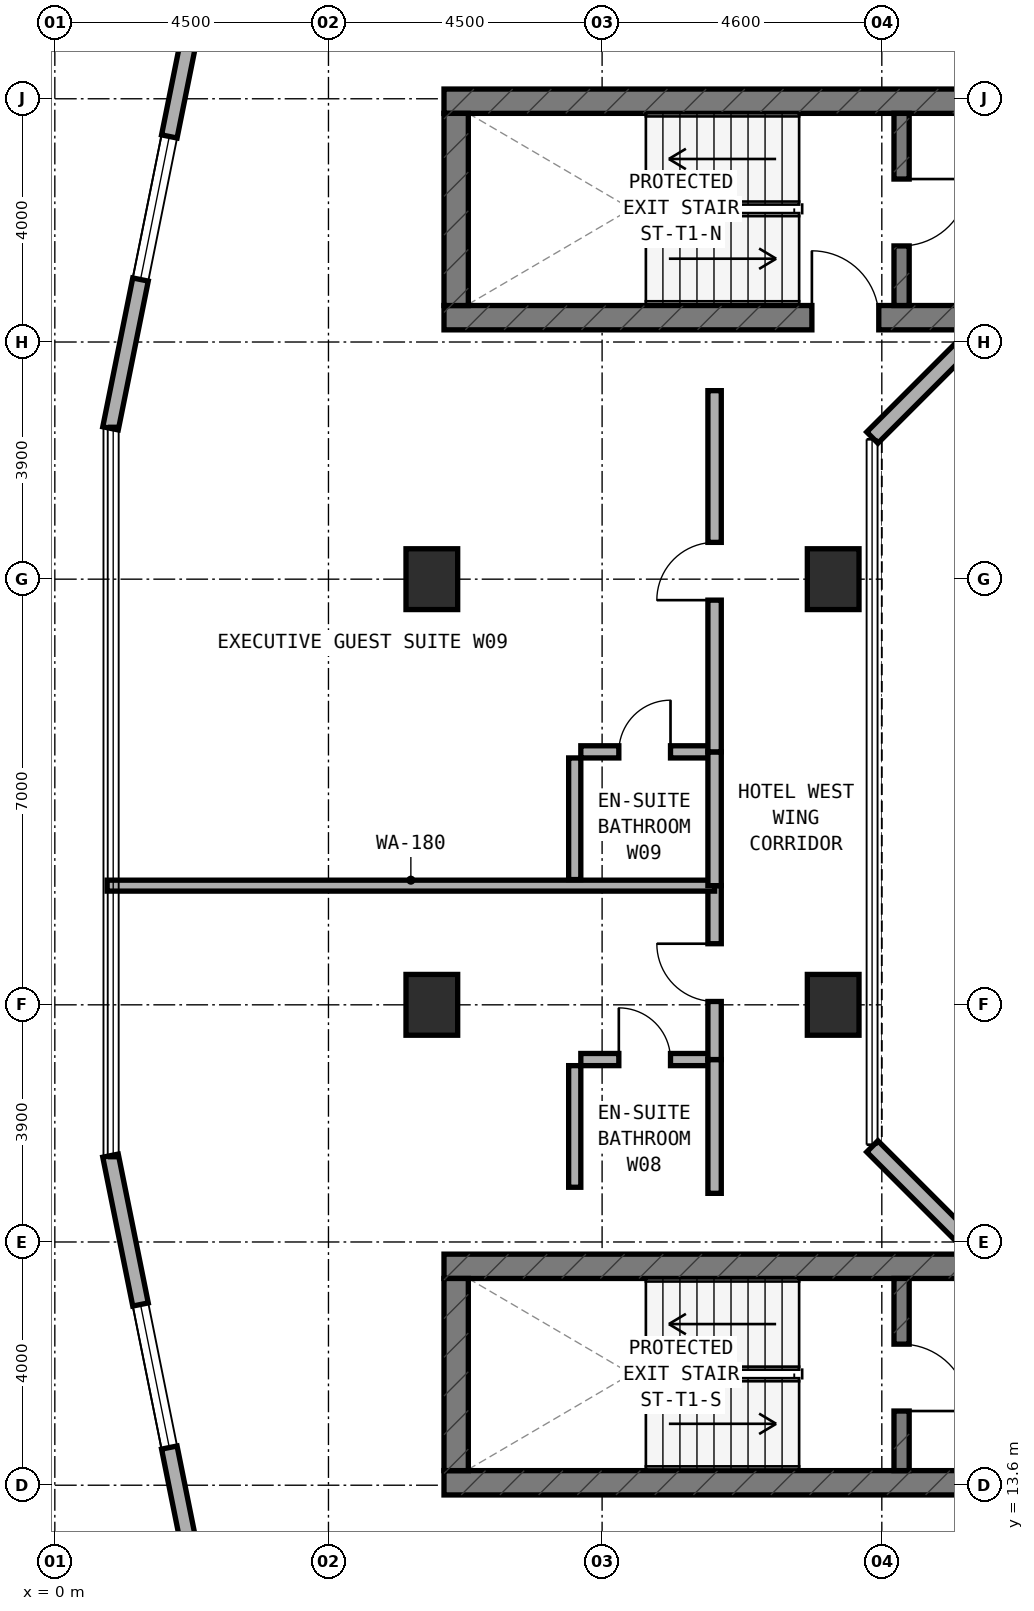
"""IFC4 building model, lengths in metres.
Left out: names, types, materials, properties, quantities, classifications, styles, units other than length and angle.
Written with IfcOpenShell. Run it as: python <this file> out.ifc"""

import sys

from ifc_helpers import new_model, si_unit, direction, frame, frame_2d, origin, origin_2d, place, context, subcontext, project, spatial, rectangle, extrude, element, fill, save


model = new_model("IFC4")
c1 = context("Model", 3, precision=1e-05, world=origin(), true_north=direction((0.0, 1.0)))
c2 = subcontext(c1, "Body", "Model", "MODEL_VIEW")
j1 = project(units=[si_unit("LENGTHUNIT", "METRE"), si_unit("PLANEANGLEUNIT", "RADIAN")], contexts=[c1])
p1 = place(None, origin())
s1 = spatial("IfcSite", under=j1, at=p1, CompositionType="ELEMENT")
p2 = place(p1, origin())
s2 = spatial("IfcBuilding", under=s1, at=p2, CompositionType="ELEMENT")
p3 = place(p2, frame((0.0, 0.0, 127.5)))
s3 = spatial("IfcBuildingStorey", under=s2, at=p3, CompositionType="ELEMENT", Elevation=127.5)
p4 = place(p3, frame((6.4, 32.8, 0.0), z_axis=(0.0, 0.0, 1.0), x_axis=(1.0, 0.0, 0.0)))
e1 = element("IfcWall", 1, at=p4, inside=s3, PredefinedType="SHEAR", context=c2, shape_type="SweptSolid", body=[
    extrude(rectangle(XDim=24.4, YDim=0.4, at=frame_2d((12.2, 0.0))), origin(), (0.0, 0.0, 1.0), 3.5),
])
p5 = place(p4, frame((6.05, 0.0, 0.0)))
e2 = element("IfcOpeningElement", 2, at=p5, cuts=e1, PredefinedType="OPENING", context=c2, shape_type="SweptSolid", body=[
    extrude(rectangle(XDim=1.1, YDim=2.15, at=frame_2d((0.55, 1.075))), frame((0.0, 0.21, 0.0), z_axis=(0.0, -1.0, 0.0), x_axis=(1.0, 0.0, 0.0)), (0.0, 0.0, 1.0), 0.42),
])
p6 = place(p3, frame((6.4, 36.36, 0.0), z_axis=(0.0, 0.0, 1.0), x_axis=(1.0, 0.0, 0.0)))
e3 = element("IfcWall", 3, at=p6, inside=s3, PredefinedType="SHEAR", context=c2, shape_type="SweptSolid", body=[
    extrude(rectangle(XDim=24.4, YDim=0.4, at=frame_2d((12.2, 0.0))), origin(), (0.0, 0.0, 1.0), 3.5),
])
p7 = place(p6, frame((9.15, 0.0, 0.0)))
e4 = element("IfcOpeningElement", 4, at=p7, cuts=e3, PredefinedType="OPENING", context=c2, shape_type="SweptSolid", body=[
    extrude(rectangle(XDim=1.2, YDim=2.15, at=frame_2d((0.6, 1.075))), frame((0.0, 0.21, 0.0), z_axis=(0.0, -1.0, 0.0), x_axis=(1.0, 0.0, 0.0)), (0.0, 0.0, 1.0), 0.42),
])
p8 = place(p6, frame((17.22, 0.0, 0.0)))
e5 = element("IfcOpeningElement", 5, at=p8, cuts=e3, PredefinedType="OPENING", context=c2, shape_type="SweptSolid", body=[
    extrude(rectangle(XDim=0.85, YDim=2.1, at=frame_2d((0.425, 1.05))), frame((0.0, 0.21, 0.0), z_axis=(0.0, -1.0, 0.0), x_axis=(1.0, 0.0, 0.0)), (0.0, 0.0, 1.0), 0.42),
])
p9 = place(p6, frame((18.783, 0.0, 0.0)))
e6 = element("IfcOpeningElement", 6, at=p9, cuts=e3, PredefinedType="OPENING", context=c2, shape_type="SweptSolid", body=[
    extrude(rectangle(XDim=1.1, YDim=2.15, at=frame_2d((0.55, 1.075))), frame((0.0, 0.21, 0.0), z_axis=(0.0, -1.0, 0.0), x_axis=(1.0, 0.0, 0.0)), (0.0, 0.0, 1.0), 0.42),
])
p10 = place(p6, frame((20.65, 0.0, 0.0)))
e7 = element("IfcOpeningElement", 7, at=p10, cuts=e3, PredefinedType="OPENING", context=c2, shape_type="SweptSolid", body=[
    extrude(rectangle(XDim=1.1, YDim=2.15, at=frame_2d((0.55, 1.075))), frame((0.0, 0.21, 0.0), z_axis=(0.0, -1.0, 0.0), x_axis=(1.0, 0.0, 0.0)), (0.0, 0.0, 1.0), 0.42),
])
p11 = place(p6, frame((22.517, 0.0, 0.0)))
e8 = element("IfcOpeningElement", 8, at=p11, cuts=e3, PredefinedType="OPENING", context=c2, shape_type="SweptSolid", body=[
    extrude(rectangle(XDim=1.1, YDim=2.15, at=frame_2d((0.55, 1.075))), frame((0.0, 0.21, 0.0), z_axis=(0.0, -1.0, 0.0), x_axis=(1.0, 0.0, 0.0)), (0.0, 0.0, 1.0), 0.42),
])
p12 = place(p3, frame((6.6, 33.0, 0.0), z_axis=(0.0, 0.0, 1.0), x_axis=(0.0, 1.0, 0.0)))
e9 = element("IfcWall", 9, at=p12, inside=s3, PredefinedType="SHEAR", context=c2, shape_type="SweptSolid", body=[
    extrude(rectangle(XDim=3.16, YDim=0.4, at=frame_2d((1.58, 0.0))), origin(), (0.0, 0.0, 1.0), 3.5),
])
p13 = place(p3, frame((13.925, 33.0, 0.0), z_axis=(0.0, 0.0, 1.0), x_axis=(0.0, 1.0, 0.0)))
e10 = element("IfcWall", 10, at=p13, inside=s3, PredefinedType="STANDARD", context=c2, shape_type="SweptSolid", body=[
    extrude(rectangle(XDim=3.16, YDim=0.25, at=frame_2d((1.58, 0.0))), origin(), (0.0, 0.0, 1.0), 3.22),
])
p14 = place(p13, frame((0.98, 0.0, 0.0)))
e11 = element("IfcOpeningElement", 11, at=p14, cuts=e10, PredefinedType="OPENING", context=c2, shape_type="SweptSolid", body=[
    extrude(rectangle(XDim=1.1, YDim=2.15, at=frame_2d((0.55, 1.075))), frame((0.0, 0.135, 0.0), z_axis=(0.0, -1.0, 0.0), x_axis=(1.0, 0.0, 0.0)), (0.0, 0.0, 1.0), 0.27),
])
p15 = place(p3, frame((6.4, 13.64, 0.0), z_axis=(0.0, 0.0, 1.0), x_axis=(1.0, 0.0, 0.0)))
e12 = element("IfcWall", 12, at=p15, inside=s3, PredefinedType="SHEAR", context=c2, shape_type="SweptSolid", body=[
    extrude(rectangle(XDim=24.4, YDim=0.4, at=frame_2d((12.2, 0.0))), origin(), (0.0, 0.0, 1.0), 3.5),
])
p16 = place(p15, frame((9.15, 0.0, 0.0)))
e13 = element("IfcOpeningElement", 13, at=p16, cuts=e12, PredefinedType="OPENING", context=c2, shape_type="SweptSolid", body=[
    extrude(rectangle(XDim=1.2, YDim=2.15, at=frame_2d((0.6, 1.075))), frame((0.0, 0.21, 0.0), z_axis=(0.0, -1.0, 0.0), x_axis=(1.0, 0.0, 0.0)), (0.0, 0.0, 1.0), 0.42),
])
p17 = place(p15, frame((17.22, 0.0, 0.0)))
e14 = element("IfcOpeningElement", 14, at=p17, cuts=e12, PredefinedType="OPENING", context=c2, shape_type="SweptSolid", body=[
    extrude(rectangle(XDim=0.85, YDim=2.1, at=frame_2d((0.425, 1.05))), frame((0.0, 0.21, 0.0), z_axis=(0.0, -1.0, 0.0), x_axis=(1.0, 0.0, 0.0)), (0.0, 0.0, 1.0), 0.42),
])
p18 = place(p15, frame((18.783, 0.0, 0.0)))
e15 = element("IfcOpeningElement", 15, at=p18, cuts=e12, PredefinedType="OPENING", context=c2, shape_type="SweptSolid", body=[
    extrude(rectangle(XDim=1.1, YDim=2.15, at=frame_2d((0.55, 1.075))), frame((0.0, 0.21, 0.0), z_axis=(0.0, -1.0, 0.0), x_axis=(1.0, 0.0, 0.0)), (0.0, 0.0, 1.0), 0.42),
])
p19 = place(p15, frame((20.65, 0.0, 0.0)))
e16 = element("IfcOpeningElement", 16, at=p19, cuts=e12, PredefinedType="OPENING", context=c2, shape_type="SweptSolid", body=[
    extrude(rectangle(XDim=1.1, YDim=2.15, at=frame_2d((0.55, 1.075))), frame((0.0, 0.21, 0.0), z_axis=(0.0, -1.0, 0.0), x_axis=(1.0, 0.0, 0.0)), (0.0, 0.0, 1.0), 0.42),
])
p20 = place(p15, frame((22.517, 0.0, 0.0)))
e17 = element("IfcOpeningElement", 17, at=p20, cuts=e12, PredefinedType="OPENING", context=c2, shape_type="SweptSolid", body=[
    extrude(rectangle(XDim=1.1, YDim=2.15, at=frame_2d((0.55, 1.075))), frame((0.0, 0.21, 0.0), z_axis=(0.0, -1.0, 0.0), x_axis=(1.0, 0.0, 0.0)), (0.0, 0.0, 1.0), 0.42),
])
p21 = place(p3, frame((6.4, 17.2, 0.0), z_axis=(0.0, 0.0, 1.0), x_axis=(1.0, 0.0, 0.0)))
e18 = element("IfcWall", 18, at=p21, inside=s3, PredefinedType="SHEAR", context=c2, shape_type="SweptSolid", body=[
    extrude(rectangle(XDim=24.4, YDim=0.4, at=frame_2d((12.2, 0.0))), origin(), (0.0, 0.0, 1.0), 3.5),
])
p22 = place(p3, frame((6.6, 13.84, 0.0), z_axis=(0.0, 0.0, 1.0), x_axis=(0.0, 1.0, 0.0)))
e19 = element("IfcWall", 19, at=p22, inside=s3, PredefinedType="SHEAR", context=c2, shape_type="SweptSolid", body=[
    extrude(rectangle(XDim=3.16, YDim=0.4, at=frame_2d((1.58, 0.0))), origin(), (0.0, 0.0, 1.0), 3.5),
])
p23 = place(p3, frame((13.925, 13.84, 0.0), z_axis=(0.0, 0.0, 1.0), x_axis=(0.0, 1.0, 0.0)))
e20 = element("IfcWall", 20, at=p23, inside=s3, PredefinedType="STANDARD", context=c2, shape_type="SweptSolid", body=[
    extrude(rectangle(XDim=3.16, YDim=0.25, at=frame_2d((1.58, 0.0))), origin(), (0.0, 0.0, 1.0), 3.22),
])
p24 = place(p23, frame((0.98, 0.0, 0.0)))
e21 = element("IfcOpeningElement", 21, at=p24, cuts=e20, PredefinedType="OPENING", context=c2, shape_type="SweptSolid", body=[
    extrude(rectangle(XDim=1.1, YDim=2.15, at=frame_2d((0.55, 1.075))), frame((0.0, 0.135, 0.0), z_axis=(0.0, -1.0, 0.0), x_axis=(1.0, 0.0, 0.0)), (0.0, 0.0, 1.0), 0.27),
])
for number, where, z_axis, x_axis in (
    (22, (6.2, 21.5, 0.0), (0.0, 0.0, 1.0), (1.0, 0.0, 0.0)),
    (23, (6.2, 28.5, 0.0), (0.0, 0.0, 1.0), (1.0, 0.0, 0.0)),
    (24, (12.8, 21.5, 0.0), (0.0, 0.0, 1.0), (1.0, 0.0, 0.0)),
    (25, (12.8, 28.5, 0.0), (0.0, 0.0, 1.0), (1.0, 0.0, 0.0)),
):
    element("IfcColumn", number, at=place(p3, frame(where, z_axis=z_axis, x_axis=x_axis)), inside=s3, PredefinedType="COLUMN", context=c2, shape_type="SweptSolid", body=[
        extrude(rectangle(XDim=0.85, YDim=1.0, at=origin_2d()), origin(), (0.0, 0.0, 1.0), 3.5),
    ])
p25 = place(p3, frame((2.729, 39.982, 0.0), z_axis=(0.0, 0.0, 1.0), x_axis=(-0.197435082048, -0.980315963543, 0.0)))
e26 = element("IfcWall", 26, at=p25, inside=s3, PredefinedType="STANDARD", context=c2, shape_type="SweptSolid", body=[
    extrude(rectangle(XDim=9.183, YDim=0.26, at=frame_2d((4.591, 0.0))), origin(), (0.0, 0.0, 1.0), 3.22),
])
p26 = place(p25, frame((4.286, 0.0, 0.8)))
e27 = element("IfcOpeningElement", 27, at=p26, cuts=e26, PredefinedType="OPENING", context=c2, shape_type="SweptSolid", body=[
    extrude(rectangle(XDim=2.4, YDim=1.6, at=frame_2d((1.2, 0.8))), frame((0.0, 0.14, 0.0), z_axis=(0.0, -1.0, 0.0), x_axis=(1.0, 0.0, 0.0)), (0.0, 0.0, 1.0), 0.28),
])
p27 = place(p3, frame((0.916, 19.02, 0.0), z_axis=(0.0, 0.0, 1.0), x_axis=(0.197435082048, -0.980315963543, 0.0)))
e28 = element("IfcWall", 28, at=p27, inside=s3, PredefinedType="STANDARD", context=c2, shape_type="SweptSolid", body=[
    extrude(rectangle(XDim=9.183, YDim=0.26, at=frame_2d((4.591, 0.0))), origin(), (0.0, 0.0, 1.0), 3.22),
])
p28 = place(p27, frame((2.497, 0.0, 0.8)))
e29 = element("IfcOpeningElement", 29, at=p28, cuts=e28, PredefinedType="OPENING", context=c2, shape_type="SweptSolid", body=[
    extrude(rectangle(XDim=2.4, YDim=1.6, at=frame_2d((1.2, 0.8))), frame((0.0, 0.14, 0.0), z_axis=(0.0, -1.0, 0.0), x_axis=(1.0, 0.0, 0.0)), (0.0, 0.0, 1.0), 0.28),
])
for number, where, z_axis, x_axis in (
    (30, (15.278, 32.662, 0.0), (0.0, 0.0, 1.0), (-0.707, -0.707, 0.0)),
    (31, (13.444, 19.172, 0.0), (0.0, 0.0, 1.0), (0.707, -0.707, 0.0)),
):
    element("IfcWall", number, at=place(p3, frame(where, z_axis=z_axis, x_axis=x_axis)), inside=s3, PredefinedType="STANDARD", context=c2, shape_type="SweptSolid", body=[
        extrude(rectangle(XDim=2.594, YDim=0.26, at=frame_2d((1.297, 0.0))), origin(), (0.0, 0.0, 1.0), 3.22),
    ])
p29 = place(p3, frame((8.65, 20.6, 0.0), z_axis=(0.0, 0.0, 1.0), x_axis=(1.0, 0.0, 0.0)))
e32 = element("IfcWall", 32, at=p29, inside=s3, PredefinedType="PLUMBINGWALL", context=c2, shape_type="SweptSolid", body=[
    extrude(rectangle(XDim=2.1, YDim=0.2, at=frame_2d((1.05, 0.0))), origin(), (0.0, 0.0, 1.0), 3.22),
])
p30 = place(p29, frame((0.625, 0.0, 0.0)))
e33 = element("IfcOpeningElement", 33, at=p30, cuts=e32, PredefinedType="OPENING", context=c2, shape_type="SweptSolid", body=[
    extrude(rectangle(XDim=0.85, YDim=2.1, at=frame_2d((0.425, 1.05))), frame((0.0, 0.11, 0.0), z_axis=(0.0, -1.0, 0.0), x_axis=(1.0, 0.0, 0.0)), (0.0, 0.0, 1.0), 0.22),
])
p31 = place(p3, frame((8.55, 18.5, 0.0), z_axis=(0.0, 0.0, 1.0), x_axis=(0.0, 1.0, 0.0)))
e34 = element("IfcWall", 34, at=p31, inside=s3, PredefinedType="PLUMBINGWALL", context=c2, shape_type="SweptSolid", body=[
    extrude(rectangle(XDim=2.0, YDim=0.2, at=frame_2d((1.0, 0.0))), origin(), (0.0, 0.0, 1.0), 3.22),
])
p32 = place(p3, frame((10.85, 18.4, 0.0), z_axis=(0.0, 0.0, 1.0), x_axis=(0.0, 1.0, 0.0)))
e35 = element("IfcWall", 35, at=p32, inside=s3, PredefinedType="SOLIDWALL", context=c2, shape_type="SweptSolid", body=[
    extrude(rectangle(XDim=2.2, YDim=0.22, at=frame_2d((1.1, 0.0))), origin(), (0.0, 0.0, 1.0), 3.22),
])
p33 = place(p3, frame((10.85, 20.6, 0.0), z_axis=(0.0, 0.0, 1.0), x_axis=(0.0, 1.0, 0.0)))
e36 = element("IfcWall", 36, at=p33, inside=s3, PredefinedType="SOLIDWALL", context=c2, shape_type="SweptSolid", body=[
    extrude(rectangle(XDim=2.86, YDim=0.22, at=frame_2d((1.43, 0.0))), origin(), (0.0, 0.0, 1.0), 2.695),
])
p34 = place(p33, frame((0.955, 0.0, 0.0)))
e37 = element("IfcOpeningElement", 37, at=p34, cuts=e36, PredefinedType="OPENING", context=c2, shape_type="SweptSolid", body=[
    extrude(rectangle(XDim=0.95, YDim=2.1, at=frame_2d((0.475, 1.05))), frame((0.0, 0.12, 0.0), z_axis=(0.0, -1.0, 0.0), x_axis=(1.0, 0.0, 0.0)), (0.0, 0.0, 1.0), 0.24),
])
p35 = place(p3, frame((0.86, 23.46, 0.0), z_axis=(0.0, 0.0, 1.0), x_axis=(1.0, 0.0, 0.0)))
e38 = element("IfcWall", 38, at=p35, inside=s3, PredefinedType="SOLIDWALL", context=c2, shape_type="SweptSolid", body=[
    extrude(rectangle(XDim=9.99, YDim=0.18, at=frame_2d((4.995, 0.0))), origin(), (0.0, 0.0, 1.0), 2.835),
])
p36 = place(p3, frame((8.65, 25.66, 0.0), z_axis=(0.0, 0.0, 1.0), x_axis=(1.0, 0.0, 0.0)))
e39 = element("IfcWall", 39, at=p36, inside=s3, PredefinedType="PLUMBINGWALL", context=c2, shape_type="SweptSolid", body=[
    extrude(rectangle(XDim=2.1, YDim=0.2, at=frame_2d((1.05, 0.0))), origin(), (0.0, 0.0, 1.0), 3.22),
])
p37 = place(p36, frame((0.625, 0.0, 0.0)))
e40 = element("IfcOpeningElement", 40, at=p37, cuts=e39, PredefinedType="OPENING", context=c2, shape_type="SweptSolid", body=[
    extrude(rectangle(XDim=0.85, YDim=2.1, at=frame_2d((0.425, 1.05))), frame((0.0, 0.11, 0.0), z_axis=(0.0, -1.0, 0.0), x_axis=(1.0, 0.0, 0.0)), (0.0, 0.0, 1.0), 0.22),
])
p38 = place(p3, frame((8.55, 23.56, 0.0), z_axis=(0.0, 0.0, 1.0), x_axis=(0.0, 1.0, 0.0)))
e41 = element("IfcWall", 41, at=p38, inside=s3, PredefinedType="PLUMBINGWALL", context=c2, shape_type="SweptSolid", body=[
    extrude(rectangle(XDim=2.0, YDim=0.2, at=frame_2d((1.0, 0.0))), origin(), (0.0, 0.0, 1.0), 3.22),
])
p39 = place(p3, frame((10.85, 23.46, 0.0), z_axis=(0.0, 0.0, 1.0), x_axis=(0.0, 1.0, 0.0)))
e42 = element("IfcWall", 42, at=p39, inside=s3, PredefinedType="SOLIDWALL", context=c2, shape_type="SweptSolid", body=[
    extrude(rectangle(XDim=2.2, YDim=0.22, at=frame_2d((1.1, 0.0))), origin(), (0.0, 0.0, 1.0), 3.22),
])
p40 = place(p3, frame((10.85, 25.66, 0.0), z_axis=(0.0, 0.0, 1.0), x_axis=(0.0, 1.0, 0.0)))
e43 = element("IfcWall", 43, at=p40, inside=s3, PredefinedType="SOLIDWALL", context=c2, shape_type="SweptSolid", body=[
    extrude(rectangle(XDim=5.94, YDim=0.22, at=frame_2d((2.97, 0.0))), origin(), (0.0, 0.0, 1.0), 2.695),
])
p41 = place(p40, frame((2.495, 0.0, 0.0)))
e44 = element("IfcOpeningElement", 44, at=p41, cuts=e43, PredefinedType="OPENING", context=c2, shape_type="SweptSolid", body=[
    extrude(rectangle(XDim=0.95, YDim=2.1, at=frame_2d((0.475, 1.05))), frame((0.0, 0.12, 0.0), z_axis=(0.0, -1.0, 0.0), x_axis=(1.0, 0.0, 0.0)), (0.0, 0.0, 1.0), 0.24),
])
p42 = place(p26, origin())
e45 = element("IfcWindow", 45, at=p42, inside=s3, PartitioningType="SINGLE_PANEL", PredefinedType="WINDOW", context=c2, shape_type="SweptSolid", body=[
    extrude(rectangle(XDim=2.4, YDim=1.6, at=frame_2d((1.2, 0.8))), frame((0.0, 0.03, 0.0), z_axis=(0.0, -1.0, 0.0), x_axis=(1.0, 0.0, 0.0)), (0.0, 0.0, 1.0), 0.06),
])
fill(e27, e45)
p43 = place(p28, origin())
e46 = element("IfcWindow", 46, at=p43, inside=s3, PartitioningType="SINGLE_PANEL", PredefinedType="WINDOW", context=c2, shape_type="SweptSolid", body=[
    extrude(rectangle(XDim=2.4, YDim=1.6, at=frame_2d((1.2, 0.8))), frame((0.0, 0.03, 0.0), z_axis=(0.0, -1.0, 0.0), x_axis=(1.0, 0.0, 0.0)), (0.0, 0.0, 1.0), 0.06),
])
fill(e29, e46)
p44 = place(p14, frame((1.1, 0.0, 0.0), z_axis=(0.0, 0.0, 1.0), x_axis=(-1.0, 0.0, 0.0)))
e47 = element("IfcDoor", 47, at=p44, inside=s3, OperationType="SINGLE_SWING_LEFT", PredefinedType="DOOR", context=c2, shape_type="SweptSolid", body=[
    extrude(rectangle(XDim=1.1, YDim=2.15, at=frame_2d((0.55, 1.075))), frame((0.0, 0.025, 0.0), z_axis=(0.0, -1.0, 0.0), x_axis=(1.0, 0.0, 0.0)), (0.0, 0.0, 1.0), 0.05),
])
fill(e11, e47)
p45 = place(p24, frame((1.1, 0.0, 0.0), z_axis=(0.0, 0.0, 1.0), x_axis=(-1.0, 0.0, 0.0)))
e48 = element("IfcDoor", 48, at=p45, inside=s3, OperationType="SINGLE_SWING_RIGHT", PredefinedType="DOOR", context=c2, shape_type="SweptSolid", body=[
    extrude(rectangle(XDim=1.1, YDim=2.15, at=frame_2d((0.55, 1.075))), frame((0.0, 0.025, 0.0), z_axis=(0.0, -1.0, 0.0), x_axis=(1.0, 0.0, 0.0)), (0.0, 0.0, 1.0), 0.05),
])
fill(e21, e48)
p46 = place(p5, origin())
e49 = element("IfcDoor", 49, at=p46, inside=s3, OperationType="SINGLE_SWING_LEFT", PredefinedType="DOOR", context=c2, shape_type="SweptSolid", body=[
    extrude(rectangle(XDim=1.1, YDim=2.15, at=frame_2d((0.55, 1.075))), frame((0.0, 0.025, 0.0), z_axis=(0.0, -1.0, 0.0), x_axis=(1.0, 0.0, 0.0)), (0.0, 0.0, 1.0), 0.05),
])
fill(e2, e49)
p47 = place(p30, origin())
e50 = element("IfcDoor", 50, at=p47, inside=s3, OperationType="SINGLE_SWING_LEFT", PredefinedType="DOOR", context=c2, shape_type="SweptSolid", body=[
    extrude(rectangle(XDim=0.85, YDim=2.1, at=frame_2d((0.425, 1.05))), frame((0.0, 0.025, 0.0), z_axis=(0.0, -1.0, 0.0), x_axis=(1.0, 0.0, 0.0)), (0.0, 0.0, 1.0), 0.05),
])
fill(e33, e50)
p48 = place(p34, origin())
e51 = element("IfcDoor", 51, at=p48, inside=s3, OperationType="SINGLE_SWING_RIGHT", PredefinedType="DOOR", context=c2, shape_type="SweptSolid", body=[
    extrude(rectangle(XDim=0.95, YDim=2.1, at=frame_2d((0.475, 1.05))), frame((0.0, 0.025, 0.0), z_axis=(0.0, -1.0, 0.0), x_axis=(1.0, 0.0, 0.0)), (0.0, 0.0, 1.0), 0.05),
])
fill(e37, e51)
p49 = place(p37, origin())
e52 = element("IfcDoor", 52, at=p49, inside=s3, OperationType="SINGLE_SWING_RIGHT", PredefinedType="DOOR", context=c2, shape_type="SweptSolid", body=[
    extrude(rectangle(XDim=0.85, YDim=2.1, at=frame_2d((0.425, 1.05))), frame((0.0, 0.025, 0.0), z_axis=(0.0, -1.0, 0.0), x_axis=(1.0, 0.0, 0.0)), (0.0, 0.0, 1.0), 0.05),
])
fill(e40, e52)
p50 = place(p41, origin())
e53 = element("IfcDoor", 53, at=p50, inside=s3, OperationType="SINGLE_SWING_LEFT", PredefinedType="DOOR", context=c2, shape_type="SweptSolid", body=[
    extrude(rectangle(XDim=0.95, YDim=2.1, at=frame_2d((0.475, 1.05))), frame((0.0, 0.025, 0.0), z_axis=(0.0, -1.0, 0.0), x_axis=(1.0, 0.0, 0.0)), (0.0, 0.0, 1.0), 0.05),
])
fill(e44, e53)
save(model, sys.argv[1])
